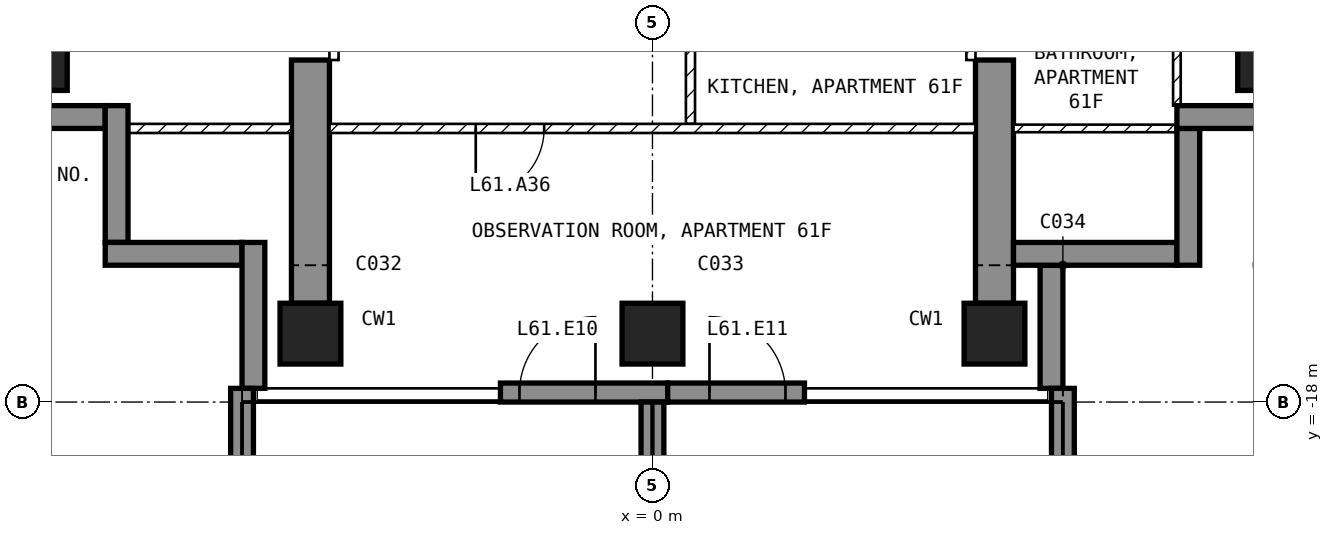
"""IFC4 building model, lengths in metres.
Left out: names, types, materials, properties, quantities, classifications, styles, units other than length and angle.
Written with IfcOpenShell. Run it as: python <this file> out.ifc"""

import sys

from ifc_helpers import new_model, si_unit, direction, frame, frame_2d, origin, origin_2d, place, context, subcontext, project, spatial, polyline, rectangle, outline, extrude, element, fill, save


model = new_model("IFC4")
c1 = context("Model", 3, precision=1e-05, world=origin(), true_north=direction((0.0, 1.0)))
c2 = subcontext(c1, "Body", "Model", "MODEL_VIEW")
j1 = project(units=[si_unit("LENGTHUNIT", "METRE"), si_unit("PLANEANGLEUNIT", "RADIAN")], contexts=[c1])
p1 = place(None, origin())
s1 = spatial("IfcSite", under=j1, at=p1, CompositionType="ELEMENT")
p2 = place(p1, origin())
s2 = spatial("IfcBuilding", under=s1, at=p2, CompositionType="ELEMENT")
p3 = place(p2, frame((0.0, 0.0, 243.0)))
s3 = spatial("IfcBuildingStorey", under=s2, at=p3, CompositionType="ELEMENT", Elevation=243.0)
for number, where, z_axis, x_axis in (
    (1, (-8.1, -13.5, -0.25), (0.0, 0.0, 1.0), (1.0, 0.0, 0.0)),
    (2, (-4.5, -17.1, -0.25), (0.0, 0.0, 1.0), (1.0, 0.0, 0.0)),
    (3, (0.0, -17.1, -0.25), (0.0, 0.0, 1.0), (1.0, 0.0, 0.0)),
    (4, (4.5, -17.1, -0.25), (0.0, 0.0, 1.0), (1.0, 0.0, 0.0)),
    (5, (8.1, -13.5, -0.25), (0.0, 0.0, 1.0), (1.0, 0.0, 0.0)),
):
    element("IfcColumn", number, at=place(p3, frame(where, z_axis=z_axis, x_axis=x_axis)), inside=s3, PredefinedType="COLUMN", context=c2, shape_type="SweptSolid", body=[
        extrude(rectangle(XDim=0.8, YDim=0.8, at=origin_2d()), origin(), (0.0, 0.0, 1.0), 3.5),
    ])
for number, where, z_axis, x_axis in (
    (6, (-4.75, -16.7, -0.25), (1.0, 0.0, 0.0), (0.0, 1.0, 0.0)),
    (7, (4.25, -16.7, -0.25), (1.0, 0.0, 0.0), (0.0, 1.0, 0.0)),
):
    element("IfcWall", number, at=place(p3, frame(where, z_axis=z_axis, x_axis=x_axis)), inside=s3, PredefinedType="SHEAR", context=c2, shape_type="SweptSolid", body=[
        extrude(outline(polyline([(0.0, 0.0), (3.2, 0.0), (3.2, 2.65), (5.6, 2.65), (5.6, 0.0), (7.7, 0.0), (7.7, 3.5), (0.0, 3.5), (0.0, 0.0)])), origin(), (0.0, 0.0, 1.0), 0.5),
    ])
p4 = place(p3, frame((-2.0, -17.875, 0.0), z_axis=(0.0, 0.0, 1.0), x_axis=(1.0, 0.0, 0.0)))
e8 = element("IfcWall", 8, at=p4, inside=s3, PredefinedType="SOLIDWALL", context=c2, shape_type="SweptSolid", body=[
    extrude(rectangle(XDim=2.2, YDim=0.25, at=frame_2d((1.1, 0.0))), origin(), (0.0, 0.0, 1.0), 3.25),
])
p5 = place(p4, frame((0.25, 0.0, 0.0)))
e9 = element("IfcOpeningElement", 9, at=p5, cuts=e8, PredefinedType="OPENING", context=c2, shape_type="SweptSolid", body=[
    extrude(rectangle(XDim=1.0, YDim=2.4, at=frame_2d((0.5, 1.2))), frame((0.0, 0.135, 0.0), z_axis=(0.0, -1.0, 0.0), x_axis=(1.0, 0.0, 0.0)), (0.0, 0.0, 1.0), 0.27),
])
p6 = place(p3, frame((0.2, -17.875, 0.0), z_axis=(0.0, 0.0, 1.0), x_axis=(1.0, 0.0, 0.0)))
e10 = element("IfcWall", 10, at=p6, inside=s3, PredefinedType="SOLIDWALL", context=c2, shape_type="SweptSolid", body=[
    extrude(rectangle(XDim=1.8, YDim=0.25, at=frame_2d((0.9, 0.0))), origin(), (0.0, 0.0, 1.0), 3.25),
])
p7 = place(p6, frame((0.55, 0.0, 0.0)))
e11 = element("IfcOpeningElement", 11, at=p7, cuts=e10, PredefinedType="OPENING", context=c2, shape_type="SweptSolid", body=[
    extrude(rectangle(XDim=1.0, YDim=2.4, at=frame_2d((0.5, 1.2))), frame((0.0, 0.135, 0.0), z_axis=(0.0, -1.0, 0.0), x_axis=(1.0, 0.0, 0.0)), (0.0, 0.0, 1.0), 0.27),
])
p8 = place(p3, frame((5.25, -17.82, 0.0), z_axis=(0.0, 0.0, 1.0), x_axis=(0.0, 1.0, 0.0)))
e12 = element("IfcWall", 12, at=p8, inside=s3, PredefinedType="SOLIDWALL", context=c2, shape_type="SweptSolid", body=[
    extrude(rectangle(XDim=1.62, YDim=0.3, at=frame_2d((0.81, 0.0))), origin(), (0.0, 0.0, 1.0), 3.25),
])
p9 = place(p3, frame((4.75, -16.05, 0.0), z_axis=(0.0, 0.0, 1.0), x_axis=(1.0, 0.0, 0.0)))
e13 = element("IfcWall", 13, at=p9, inside=s3, PredefinedType="SOLIDWALL", context=c2, shape_type="SweptSolid", body=[
    extrude(rectangle(XDim=2.15, YDim=0.3, at=frame_2d((1.075, 0.0))), origin(), (0.0, 0.0, 1.0), 3.25),
])
p10 = place(p3, frame((7.05, -16.2, 0.0), z_axis=(0.0, 0.0, 1.0), x_axis=(0.0, 1.0, 0.0)))
e14 = element("IfcWall", 14, at=p10, inside=s3, PredefinedType="SOLIDWALL", context=c2, shape_type="SweptSolid", body=[
    extrude(rectangle(XDim=1.8, YDim=0.3, at=frame_2d((0.9, 0.0))), origin(), (0.0, 0.0, 1.0), 3.25),
])
p11 = place(p3, frame((6.9, -14.25, 0.0), z_axis=(0.0, 0.0, 1.0), x_axis=(1.0, 0.0, 0.0)))
e15 = element("IfcWall", 15, at=p11, inside=s3, PredefinedType="SOLIDWALL", context=c2, shape_type="SweptSolid", body=[
    extrude(rectangle(XDim=1.85, YDim=0.3, at=frame_2d((0.925, 0.0))), origin(), (0.0, 0.0, 1.0), 3.25),
])
p12 = place(p3, frame((-8.75, -14.25, 0.0), z_axis=(0.0, 0.0, 1.0), x_axis=(1.0, 0.0, 0.0)))
e16 = element("IfcWall", 16, at=p12, inside=s3, PredefinedType="SOLIDWALL", context=c2, shape_type="SweptSolid", body=[
    extrude(rectangle(XDim=1.55, YDim=0.3, at=frame_2d((0.775, 0.0))), origin(), (0.0, 0.0, 1.0), 3.25),
])
p13 = place(p3, frame((-7.05, -14.1, 0.0), z_axis=(0.0, 0.0, 1.0), x_axis=(0.0, -1.0, 0.0)))
e17 = element("IfcWall", 17, at=p13, inside=s3, PredefinedType="SOLIDWALL", context=c2, shape_type="SweptSolid", body=[
    extrude(rectangle(XDim=1.8, YDim=0.3, at=frame_2d((0.9, 0.0))), origin(), (0.0, 0.0, 1.0), 3.25),
])
p14 = place(p3, frame((-7.2, -16.05, 0.0), z_axis=(0.0, 0.0, 1.0), x_axis=(1.0, 0.0, 0.0)))
e18 = element("IfcWall", 18, at=p14, inside=s3, PredefinedType="SOLIDWALL", context=c2, shape_type="SweptSolid", body=[
    extrude(rectangle(XDim=1.8, YDim=0.3, at=frame_2d((0.9, 0.0))), origin(), (0.0, 0.0, 1.0), 3.25),
])
p15 = place(p3, frame((-5.25, -15.9, 0.0), z_axis=(0.0, 0.0, 1.0), x_axis=(0.0, -1.0, 0.0)))
e19 = element("IfcWall", 19, at=p15, inside=s3, PredefinedType="SOLIDWALL", context=c2, shape_type="SweptSolid", body=[
    extrude(rectangle(XDim=1.92, YDim=0.3, at=frame_2d((0.96, 0.0))), origin(), (0.0, 0.0, 1.0), 3.25),
])
p16 = place(p3, frame((-5.4, -17.82, 0.0), z_axis=(0.0, 0.0, 1.0), x_axis=(0.0, -1.0, 0.0)))
e20 = element("IfcWall", 20, at=p16, inside=s3, PredefinedType="SOLIDWALL", context=c2, shape_type="SweptSolid", body=[
    extrude(rectangle(XDim=2.88, YDim=0.3, at=frame_2d((1.44, 0.0))), origin(), (0.0, 0.0, 1.0), 3.25),
])
p17 = place(p3, frame((0.0, -18.0, 0.0), z_axis=(0.0, 0.0, 1.0), x_axis=(0.0, -1.0, 0.0)))
e21 = element("IfcWall", 21, at=p17, inside=s3, PredefinedType="SOLIDWALL", context=c2, shape_type="SweptSolid", body=[
    extrude(rectangle(XDim=2.7, YDim=0.3, at=frame_2d((1.35, 0.0))), origin(), (0.0, 0.0, 1.0), 3.25),
])
p18 = place(p3, frame((5.4, -17.82, 0.0), z_axis=(0.0, 0.0, 1.0), x_axis=(0.0, -1.0, 0.0)))
e22 = element("IfcWall", 22, at=p18, inside=s3, PredefinedType="SOLIDWALL", context=c2, shape_type="SweptSolid", body=[
    extrude(rectangle(XDim=2.88, YDim=0.3, at=frame_2d((1.44, 0.0))), origin(), (0.0, 0.0, 1.0), 3.25),
])
p19 = place(p3, frame((0.5, -11.46, 0.0), z_axis=(0.0, 0.0, 1.0), x_axis=(0.0, -1.0, 0.0)))
e23 = element("IfcWall", 23, at=p19, inside=s3, PredefinedType="PARTITIONING", context=c2, shape_type="SweptSolid", body=[
    extrude(rectangle(XDim=2.88, YDim=0.12, at=frame_2d((1.44, 0.0))), origin(), (0.0, 0.0, 1.0), 3.25),
])
p20 = place(p19, frame((0.99, 0.0, 0.0)))
e24 = element("IfcOpeningElement", 24, at=p20, cuts=e23, PredefinedType="OPENING", context=c2, shape_type="SweptSolid", body=[
    extrude(rectangle(XDim=0.9, YDim=2.1, at=frame_2d((0.45, 1.05))), frame((0.0, 0.07, 0.0), z_axis=(0.0, -1.0, 0.0), x_axis=(1.0, 0.0, 0.0)), (0.0, 0.0, 1.0), 0.14),
])
p21 = place(p3, frame((4.25, -14.4, 0.0), z_axis=(0.0, 0.0, 1.0), x_axis=(-1.0, 0.0, 0.0)))
e25 = element("IfcWall", 25, at=p21, inside=s3, PredefinedType="PARTITIONING", context=c2, shape_type="SweptSolid", body=[
    extrude(rectangle(XDim=8.5, YDim=0.12, at=frame_2d((4.25, 0.0))), origin(), (0.0, 0.0, 1.0), 3.25),
])
p22 = place(p21, frame((5.675, 0.0, 0.0)))
e26 = element("IfcOpeningElement", 26, at=p22, cuts=e25, PredefinedType="OPENING", context=c2, shape_type="SweptSolid", body=[
    extrude(rectangle(XDim=0.9, YDim=2.1, at=frame_2d((0.45, 1.05))), frame((0.0, 0.07, 0.0), z_axis=(0.0, -1.0, 0.0), x_axis=(1.0, 0.0, 0.0)), (0.0, 0.0, 1.0), 0.14),
])
p23 = place(p3, frame((6.9, -14.1, 0.0), z_axis=(0.0, 0.0, 1.0), x_axis=(0.0, 1.0, 0.0)))
e27 = element("IfcWall", 27, at=p23, inside=s3, PredefinedType="PARTITIONING", context=c2, shape_type="SweptSolid", body=[
    extrude(rectangle(XDim=2.65, YDim=0.1, at=frame_2d((1.325, 0.0))), origin(), (0.0, 0.0, 1.0), 3.25),
])
p24 = place(p3, frame((7.12, -14.4, 0.0), z_axis=(0.0, 0.0, 1.0), x_axis=(-1.0, 0.0, 0.0)))
e28 = element("IfcWall", 28, at=p24, inside=s3, PredefinedType="PARTITIONING", context=c2, shape_type="SweptSolid", body=[
    extrude(rectangle(XDim=2.37, YDim=0.1, at=frame_2d((1.185, 0.0))), origin(), (0.0, 0.0, 1.0), 3.25),
])
p25 = place(p3, frame((-4.75, -14.4, 0.0), z_axis=(0.0, 0.0, 1.0), x_axis=(-1.0, 0.0, 0.0)))
e29 = element("IfcWall", 29, at=p25, inside=s3, PredefinedType="PARTITIONING", context=c2, shape_type="SweptSolid", body=[
    extrude(rectangle(XDim=2.37, YDim=0.12, at=frame_2d((1.185, 0.0))), origin(), (0.0, 0.0, 1.0), 3.25),
])
p26 = place(p3, frame((4.19, -11.1, 0.0), z_axis=(0.0, 0.0, 1.0), x_axis=(0.0, -1.0, 0.0)))
e30 = element("IfcWall", 30, at=p26, inside=s3, PredefinedType="PARTITIONING", context=c2, shape_type="SweptSolid", body=[
    extrude(rectangle(XDim=2.4, YDim=0.12, at=frame_2d((1.2, 0.0))), origin(), (0.0, 0.0, 1.0), 2.4),
])
p27 = place(p26, frame((0.75, 0.0, 0.0)))
e31 = element("IfcOpeningElement", 31, at=p27, cuts=e30, PredefinedType="OPENING", context=c2, shape_type="SweptSolid", body=[
    extrude(rectangle(XDim=0.9, YDim=2.1, at=frame_2d((0.45, 1.05))), frame((0.0, 0.07, 0.0), z_axis=(0.0, -1.0, 0.0), x_axis=(1.0, 0.0, 0.0)), (0.0, 0.0, 1.0), 0.14),
])
p28 = place(p3, frame((-4.19, -11.1, 0.0), z_axis=(0.0, 0.0, 1.0), x_axis=(0.0, -1.0, 0.0)))
e32 = element("IfcWall", 32, at=p28, inside=s3, PredefinedType="PARTITIONING", context=c2, shape_type="SweptSolid", body=[
    extrude(rectangle(XDim=2.4, YDim=0.12, at=frame_2d((1.2, 0.0))), origin(), (0.0, 0.0, 1.0), 2.4),
])
p29 = place(p28, frame((0.75, 0.0, 0.0)))
e33 = element("IfcOpeningElement", 33, at=p29, cuts=e32, PredefinedType="OPENING", context=c2, shape_type="SweptSolid", body=[
    extrude(rectangle(XDim=0.9, YDim=2.1, at=frame_2d((0.45, 1.05))), frame((0.0, 0.07, 0.0), z_axis=(0.0, -1.0, 0.0), x_axis=(1.0, 0.0, 0.0)), (0.0, 0.0, 1.0), 0.14),
])
p30 = place(p5, origin())
e34 = element("IfcDoor", 34, at=p30, inside=s3, OperationType="SINGLE_SWING_RIGHT", PredefinedType="DOOR", context=c2, shape_type="SweptSolid", body=[
    extrude(rectangle(XDim=1.0, YDim=2.4, at=frame_2d((0.5, 1.2))), frame((0.0, 0.025, 0.0), z_axis=(0.0, -1.0, 0.0), x_axis=(1.0, 0.0, 0.0)), (0.0, 0.0, 1.0), 0.05),
])
fill(e9, e34)
p31 = place(p7, origin())
e35 = element("IfcDoor", 35, at=p31, inside=s3, OperationType="SINGLE_SWING_LEFT", PredefinedType="DOOR", context=c2, shape_type="SweptSolid", body=[
    extrude(rectangle(XDim=1.0, YDim=2.4, at=frame_2d((0.5, 1.2))), frame((0.0, 0.025, 0.0), z_axis=(0.0, -1.0, 0.0), x_axis=(1.0, 0.0, 0.0)), (0.0, 0.0, 1.0), 0.05),
])
fill(e11, e35)
p32 = place(p22, origin())
e36 = element("IfcDoor", 36, at=p32, inside=s3, OperationType="SINGLE_SWING_RIGHT", PredefinedType="DOOR", context=c2, shape_type="SweptSolid", body=[
    extrude(rectangle(XDim=0.9, YDim=2.1, at=frame_2d((0.45, 1.05))), frame((0.0, 0.025, 0.0), z_axis=(0.0, -1.0, 0.0), x_axis=(1.0, 0.0, 0.0)), (0.0, 0.0, 1.0), 0.05),
])
fill(e26, e36)
save(model, sys.argv[1])
